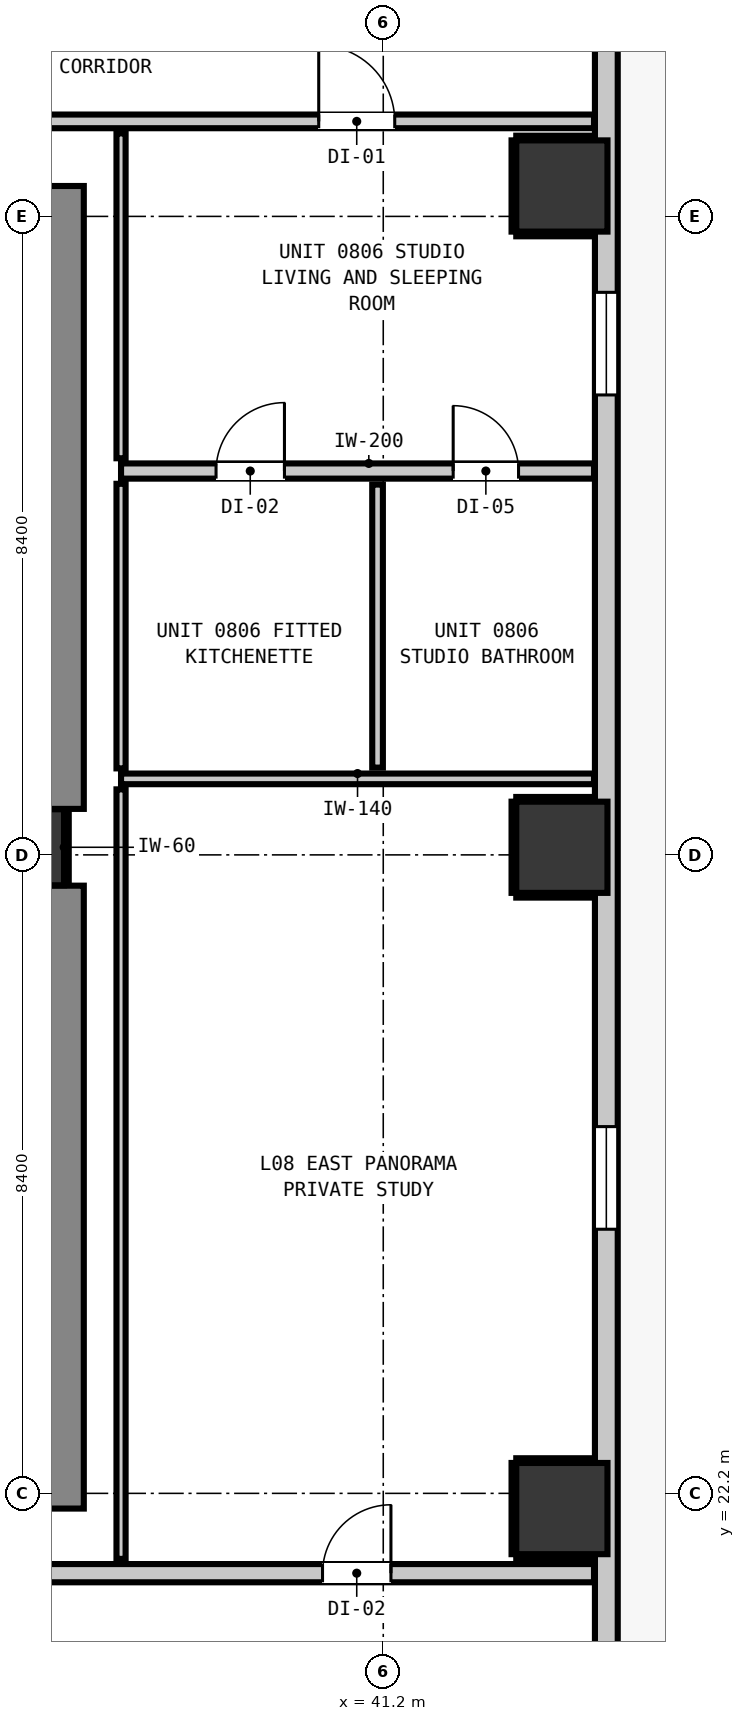
"""IFC4 building model, lengths in metres.
Left out: names, types, materials, properties, quantities, classifications, styles, units other than length and angle.
Written with IfcOpenShell. Run it as: python <this file> out.ifc"""

import sys

from ifc_helpers import new_model, si_unit, direction, frame, frame_2d, origin, origin_2d, place, context, subcontext, project, spatial, rectangle, extrude, element, fill, save


model = new_model("IFC4")
c1 = context("Model", 3, precision=1e-05, world=origin(), true_north=direction((0.0, 1.0)))
c2 = subcontext(c1, "Body", "Model", "MODEL_VIEW")
j1 = project(units=[si_unit("LENGTHUNIT", "METRE"), si_unit("PLANEANGLEUNIT", "RADIAN")], contexts=[c1])
p1 = place(None, origin())
s1 = spatial("IfcSite", under=j1, at=p1, CompositionType="ELEMENT")
p2 = place(p1, origin())
s2 = spatial("IfcBuilding", under=s1, at=p2, CompositionType="ELEMENT")
p3 = place(p2, frame((0.0, 0.0, 31.96)))
s3 = spatial("IfcBuildingStorey", under=s2, at=p3, CompositionType="ELEMENT", Elevation=31.96)
p4 = place(p3, frame((36.5, 30.7, 0.0), z_axis=(0.0, 0.0, 1.0), x_axis=(1.0, 0.0, 0.0)))
e1 = element("IfcColumn", 1, at=p4, inside=s3, PredefinedType="COLUMN", context=c2, shape_type="SweptSolid", body=[
    extrude(rectangle(XDim=1.0, YDim=1.0, at=origin_2d()), origin(), (0.0, 0.0, 1.0), 3.32),
])
p5 = place(p3, frame((36.66, 22.0, 0.0), z_axis=(0.0, 0.0, 1.0), x_axis=(0.0, 1.0, 0.0)))
e2 = element("IfcWall", 2, at=p5, inside=s3, PredefinedType="SHEAR", context=c2, shape_type="SweptSolid", body=[
    extrude(rectangle(XDim=8.195, YDim=1.2, at=frame_2d((4.098, 0.0))), origin(), (0.0, 0.0, 1.0), 3.32),
])
p6 = place(p3, frame((36.66, 31.205, 0.0), z_axis=(0.0, 0.0, 1.0), x_axis=(0.0, 1.0, 0.0)))
e3 = element("IfcWall", 3, at=p6, inside=s3, PredefinedType="SHEAR", context=c2, shape_type="SweptSolid", body=[
    extrude(rectangle(XDim=8.195, YDim=1.2, at=frame_2d((4.097, 0.0))), origin(), (0.0, 0.0, 1.0), 3.32),
])
for number, where, z_axis, x_axis in (
    (4, (43.55, 22.0, 0.0), (0.0, 0.0, 1.0), (1.0, 0.0, 0.0)),
    (5, (43.55, 30.7, 0.0), (0.0, 0.0, 1.0), (1.0, 0.0, 0.0)),
    (6, (43.55, 39.4, 0.0), (0.0, 0.0, 1.0), (1.0, 0.0, 0.0)),
):
    element("IfcColumn", number, at=place(p3, frame(where, z_axis=z_axis, x_axis=x_axis)), inside=s3, PredefinedType="COLUMN", context=c2, shape_type="SweptSolid", body=[
        extrude(rectangle(XDim=1.2, YDim=1.2, at=origin_2d()), origin(), (0.0, 0.0, 1.0), 3.32),
    ])
p7 = place(p3, frame((44.135, 44.835, 0.0), z_axis=(0.0, 0.0, 1.0), x_axis=(0.0, -1.0, 0.0)))
e7 = element("IfcWall", 7, at=p7, inside=s3, PredefinedType="STANDARD", context=c2, shape_type="SweptSolid", body=[
    extrude(rectangle(XDim=34.67, YDim=0.3, at=frame_2d((17.335, 0.0))), origin(), (0.0, 0.0, 1.0), 3.06),
])
p8 = place(p7, frame((1.251, 0.0, 0.0)))
e8 = element("IfcOpeningElement", 8, at=p8, cuts=e7, PredefinedType="OPENING", context=c2, shape_type="SweptSolid", body=[
    extrude(rectangle(XDim=1.0, YDim=2.15, at=frame_2d((0.5, 1.075))), frame((0.0, 0.16, 0.0), z_axis=(0.0, -1.0, 0.0), x_axis=(1.0, 0.0, 0.0)), (0.0, 0.0, 1.0), 0.32),
])
p9 = place(p7, frame((32.583, 0.0, 0.85)))
e9 = element("IfcOpeningElement", 9, at=p9, cuts=e7, PredefinedType="OPENING", context=c2, shape_type="SweptSolid", body=[
    extrude(rectangle(XDim=1.35, YDim=1.85, at=frame_2d((0.675, 0.925))), frame((0.0, 0.16, 0.0), z_axis=(0.0, -1.0, 0.0), x_axis=(1.0, 0.0, 0.0)), (0.0, 0.0, 1.0), 0.32),
])
p10 = place(p7, frame((17.81, 0.0, 0.85)))
e10 = element("IfcOpeningElement", 10, at=p10, cuts=e7, PredefinedType="OPENING", context=c2, shape_type="SweptSolid", body=[
    extrude(rectangle(XDim=1.35, YDim=1.85, at=frame_2d((0.675, 0.925))), frame((0.0, 0.16, 0.0), z_axis=(0.0, -1.0, 0.0), x_axis=(1.0, 0.0, 0.0)), (0.0, 0.0, 1.0), 0.32),
])
p11 = place(p7, frame((6.834, 0.0, 0.85)))
e11 = element("IfcOpeningElement", 11, at=p11, cuts=e7, PredefinedType="OPENING", context=c2, shape_type="SweptSolid", body=[
    extrude(rectangle(XDim=1.35, YDim=1.85, at=frame_2d((0.675, 0.925))), frame((0.0, 0.16, 0.0), z_axis=(0.0, -1.0, 0.0), x_axis=(1.0, 0.0, 0.0)), (0.0, 0.0, 1.0), 0.32),
])
p12 = place(p3, frame((1.827, 21.15, 0.0), z_axis=(0.0, 0.0, 1.0), x_axis=(1.0, 0.0, 0.0)))
e12 = element("IfcWall", 12, at=p12, inside=s3, PredefinedType="PARTITIONING", context=c2, shape_type="SweptSolid", body=[
    extrude(rectangle(XDim=42.146, YDim=0.24, at=frame_2d((21.073, 0.0))), origin(), (0.0, 0.0, 1.0), 3.06),
])
p13 = place(p12, frame((16.383, 0.0, 0.0)))
e13 = element("IfcOpeningElement", 13, at=p13, cuts=e12, PredefinedType="OPENING", context=c2, shape_type="SweptSolid", body=[
    extrude(rectangle(XDim=1.1, YDim=2.15, at=frame_2d((0.55, 1.075))), frame((0.0, 0.13, 0.0), z_axis=(0.0, -1.0, 0.0), x_axis=(1.0, 0.0, 0.0)), (0.0, 0.0, 1.0), 0.26),
])
p14 = place(p12, frame((8.647, 0.0, 0.0)))
e14 = element("IfcOpeningElement", 14, at=p14, cuts=e12, PredefinedType="OPENING", context=c2, shape_type="SweptSolid", body=[
    extrude(rectangle(XDim=1.4, YDim=2.15, at=frame_2d((0.7, 1.075))), frame((0.0, 0.13, 0.0), z_axis=(0.0, -1.0, 0.0), x_axis=(1.0, 0.0, 0.0)), (0.0, 0.0, 1.0), 0.26),
])
p15 = place(p12, frame((38.574, 0.0, 0.0)))
e15 = element("IfcOpeningElement", 15, at=p15, cuts=e12, PredefinedType="OPENING", context=c2, shape_type="SweptSolid", body=[
    extrude(rectangle(XDim=0.9, YDim=2.1, at=frame_2d((0.45, 1.05))), frame((0.0, 0.13, 0.0), z_axis=(0.0, -1.0, 0.0), x_axis=(1.0, 0.0, 0.0)), (0.0, 0.0, 1.0), 0.26),
])
p16 = place(p3, frame((37.75, 35.65, 0.0), z_axis=(0.0, 0.0, 1.0), x_axis=(1.0, 0.0, 0.0)))
e16 = element("IfcWall", 16, at=p16, inside=s3, PredefinedType="PARTITIONING", context=c2, shape_type="SweptSolid", body=[
    extrude(rectangle(XDim=6.223, YDim=0.2, at=frame_2d((3.111, 0.0))), origin(), (0.0, 0.0, 1.0), 3.06),
])
p17 = place(p16, frame((1.25, 0.0, 0.0)))
e17 = element("IfcOpeningElement", 17, at=p17, cuts=e16, PredefinedType="OPENING", context=c2, shape_type="SweptSolid", body=[
    extrude(rectangle(XDim=0.9, YDim=2.1, at=frame_2d((0.45, 1.05))), frame((0.0, 0.11, 0.0), z_axis=(0.0, -1.0, 0.0), x_axis=(1.0, 0.0, 0.0)), (0.0, 0.0, 1.0), 0.22),
])
p18 = place(p16, frame((4.37, 0.0, 0.0)))
e18 = element("IfcOpeningElement", 18, at=p18, cuts=e16, PredefinedType="OPENING", context=c2, shape_type="SweptSolid", body=[
    extrude(rectangle(XDim=0.86, YDim=2.02, at=frame_2d((0.43, 1.01))), frame((0.0, 0.11, 0.0), z_axis=(0.0, -1.0, 0.0), x_axis=(1.0, 0.0, 0.0)), (0.0, 0.0, 1.0), 0.22),
])
p19 = place(p3, frame((12.989, 40.25, 0.0), z_axis=(0.0, 0.0, 1.0), x_axis=(1.0, 0.0, 0.0)))
e19 = element("IfcWall", 19, at=p19, inside=s3, PredefinedType="PARTITIONING", context=c2, shape_type="SweptSolid", body=[
    extrude(rectangle(XDim=30.984, YDim=0.18, at=frame_2d((15.492, 0.0))), origin(), (0.0, 0.0, 1.0), 3.06),
])
p20 = place(p19, frame((4.446, 0.0, 0.0)))
e20 = element("IfcOpeningElement", 20, at=p20, cuts=e19, PredefinedType="OPENING", context=c2, shape_type="SweptSolid", body=[
    extrude(rectangle(XDim=1.4, YDim=2.15, at=frame_2d((0.7, 1.075))), frame((0.0, 0.1, 0.0), z_axis=(0.0, -1.0, 0.0), x_axis=(1.0, 0.0, 0.0)), (0.0, 0.0, 1.0), 0.2),
])
p21 = place(p19, frame((27.362, 0.0, 0.0)))
e21 = element("IfcOpeningElement", 21, at=p21, cuts=e19, PredefinedType="OPENING", context=c2, shape_type="SweptSolid", body=[
    extrude(rectangle(XDim=1.0, YDim=2.15, at=frame_2d((0.5, 1.075))), frame((0.0, 0.1, 0.0), z_axis=(0.0, -1.0, 0.0), x_axis=(1.0, 0.0, 0.0)), (0.0, 0.0, 1.0), 0.2),
])
p22 = place(p3, frame((37.75, 31.6, 0.0), z_axis=(0.0, 0.0, 1.0), x_axis=(1.0, 0.0, 0.0)))
e22 = element("IfcWall", 22, at=p22, inside=s3, PredefinedType="PARTITIONING", context=c2, shape_type="SweptSolid", body=[
    extrude(rectangle(XDim=6.223, YDim=0.14, at=frame_2d((3.111, 0.0))), origin(), (0.0, 0.0, 1.0), 3.06),
])
p23 = place(p3, frame((41.125, 31.748, 0.0), z_axis=(0.0, 0.0, 1.0), x_axis=(0.0, 1.0, 0.0)))
e23 = element("IfcWall", 23, at=p23, inside=s3, PredefinedType="PARTITIONING", context=c2, shape_type="SweptSolid", body=[
    extrude(rectangle(XDim=3.724, YDim=0.14, at=frame_2d((1.862, 0.0))), origin(), (0.0, 0.0, 1.0), 3.06),
])
p24 = place(p3, frame((37.75, 21.338, 0.0), z_axis=(0.0, 0.0, 1.0), x_axis=(0.0, 1.0, 0.0)))
e24 = element("IfcWall", 24, at=p24, inside=s3, PredefinedType="PARTITIONING", context=c2, shape_type="SweptSolid", body=[
    extrude(rectangle(XDim=10.124, YDim=0.12, at=frame_2d((5.062, 0.0))), origin(), (0.0, 0.0, 1.0), 3.06),
])
p25 = place(p3, frame((37.75, 31.738, 0.0), z_axis=(0.0, 0.0, 1.0), x_axis=(0.0, 1.0, 0.0)))
e25 = element("IfcWall", 25, at=p25, inside=s3, PredefinedType="PARTITIONING", context=c2, shape_type="SweptSolid", body=[
    extrude(rectangle(XDim=3.744, YDim=0.12, at=frame_2d((1.872, 0.0))), origin(), (0.0, 0.0, 1.0), 3.06),
])
p26 = place(p3, frame((37.75, 35.818, 0.0), z_axis=(0.0, 0.0, 1.0), x_axis=(0.0, 1.0, 0.0)))
e26 = element("IfcWall", 26, at=p26, inside=s3, PredefinedType="PARTITIONING", context=c2, shape_type="SweptSolid", body=[
    extrude(rectangle(XDim=4.274, YDim=0.12, at=frame_2d((2.137, 0.0))), origin(), (0.0, 0.0, 1.0), 3.06),
])
p27 = place(p3, frame((37.032, 30.21, 0.0), z_axis=(0.0, 0.0, 1.0), x_axis=(0.0, 1.0, 0.0)))
e27 = element("IfcWall", 27, at=p27, inside=s3, PredefinedType="PARTITIONING", context=c2, shape_type="SweptSolid", body=[
    extrude(rectangle(XDim=0.98, YDim=0.06, at=frame_2d((0.49, 0.0))), origin(), (0.0, 0.0, 1.0), 1.45),
])
for number, where, z_axis, x_axis in (
    (28, (42.95, 21.368, 0.0), (0.0, 0.0, 1.0), (1.0, 0.0, 0.0)),
    (29, (42.95, 22.632, 0.0), (0.0, 0.0, 1.0), (1.0, 0.0, 0.0)),
):
    element("IfcWall", number, at=place(p3, frame(where, z_axis=z_axis, x_axis=x_axis)), inside=s3, PredefinedType="PARTITIONING", context=c2, shape_type="SweptSolid", body=[
        extrude(rectangle(XDim=1.02, YDim=0.06, at=frame_2d((0.51, 0.0))), origin(), (0.0, 0.0, 1.0), 1.45),
    ])
p28 = place(p3, frame((42.918, 21.4, 0.0), z_axis=(0.0, 0.0, 1.0), x_axis=(0.0, 1.0, 0.0)))
e30 = element("IfcWall", 30, at=p28, inside=s3, PredefinedType="PARTITIONING", context=c2, shape_type="SweptSolid", body=[
    extrude(rectangle(XDim=1.2, YDim=0.06, at=frame_2d((0.6, 0.0))), origin(), (0.0, 0.0, 1.0), 1.45),
])
for number, where, z_axis, x_axis in (
    (31, (42.95, 30.068, 0.0), (0.0, 0.0, 1.0), (1.0, 0.0, 0.0)),
    (32, (42.95, 31.332, 0.0), (0.0, 0.0, 1.0), (1.0, 0.0, 0.0)),
):
    element("IfcWall", number, at=place(p3, frame(where, z_axis=z_axis, x_axis=x_axis)), inside=s3, PredefinedType="PARTITIONING", context=c2, shape_type="SweptSolid", body=[
        extrude(rectangle(XDim=1.02, YDim=0.06, at=frame_2d((0.51, 0.0))), origin(), (0.0, 0.0, 1.0), 1.45),
    ])
p29 = place(p3, frame((42.918, 30.1, 0.0), z_axis=(0.0, 0.0, 1.0), x_axis=(0.0, 1.0, 0.0)))
e33 = element("IfcWall", 33, at=p29, inside=s3, PredefinedType="PARTITIONING", context=c2, shape_type="SweptSolid", body=[
    extrude(rectangle(XDim=1.2, YDim=0.06, at=frame_2d((0.6, 0.0))), origin(), (0.0, 0.0, 1.0), 1.45),
])
for number, where, z_axis, x_axis in (
    (34, (42.95, 38.768, 0.0), (0.0, 0.0, 1.0), (1.0, 0.0, 0.0)),
    (35, (42.95, 40.032, 0.0), (0.0, 0.0, 1.0), (1.0, 0.0, 0.0)),
):
    element("IfcWall", number, at=place(p3, frame(where, z_axis=z_axis, x_axis=x_axis)), inside=s3, PredefinedType="PARTITIONING", context=c2, shape_type="SweptSolid", body=[
        extrude(rectangle(XDim=1.02, YDim=0.06, at=frame_2d((0.51, 0.0))), origin(), (0.0, 0.0, 1.0), 1.45),
    ])
p30 = place(p3, frame((42.918, 38.8, 0.0), z_axis=(0.0, 0.0, 1.0), x_axis=(0.0, 1.0, 0.0)))
e36 = element("IfcWall", 36, at=p30, inside=s3, PredefinedType="PARTITIONING", context=c2, shape_type="SweptSolid", body=[
    extrude(rectangle(XDim=1.2, YDim=0.06, at=frame_2d((0.6, 0.0))), origin(), (0.0, 0.0, 1.0), 1.45),
])
p31 = place(p10, origin())
e37 = element("IfcWindow", 37, at=p31, inside=s3, PartitioningType="SINGLE_PANEL", PredefinedType="WINDOW", context=c2, shape_type="SweptSolid", body=[
    extrude(rectangle(XDim=1.35, YDim=1.85, at=frame_2d((0.675, 0.925))), frame((0.0, 0.03, 0.0), z_axis=(0.0, -1.0, 0.0), x_axis=(1.0, 0.0, 0.0)), (0.0, 0.0, 1.0), 0.06),
])
fill(e10, e37)
p32 = place(p11, origin())
e38 = element("IfcWindow", 38, at=p32, inside=s3, PartitioningType="SINGLE_PANEL", PredefinedType="WINDOW", context=c2, shape_type="SweptSolid", body=[
    extrude(rectangle(XDim=1.35, YDim=1.85, at=frame_2d((0.675, 0.925))), frame((0.0, 0.03, 0.0), z_axis=(0.0, -1.0, 0.0), x_axis=(1.0, 0.0, 0.0)), (0.0, 0.0, 1.0), 0.06),
])
fill(e11, e38)
p33 = place(p15, origin())
e39 = element("IfcDoor", 39, at=p33, inside=s3, OperationType="SINGLE_SWING_RIGHT", PredefinedType="DOOR", context=c2, shape_type="SweptSolid", body=[
    extrude(rectangle(XDim=0.9, YDim=2.1, at=frame_2d((0.45, 1.05))), frame((0.0, 0.025, 0.0), z_axis=(0.0, -1.0, 0.0), x_axis=(1.0, 0.0, 0.0)), (0.0, 0.0, 1.0), 0.05),
])
fill(e15, e39)
p34 = place(p21, origin())
e40 = element("IfcDoor", 40, at=p34, inside=s3, OperationType="SINGLE_SWING_LEFT", PredefinedType="DOOR", context=c2, shape_type="SweptSolid", body=[
    extrude(rectangle(XDim=1.0, YDim=2.15, at=frame_2d((0.5, 1.075))), frame((0.0, 0.025, 0.0), z_axis=(0.0, -1.0, 0.0), x_axis=(1.0, 0.0, 0.0)), (0.0, 0.0, 1.0), 0.05),
])
fill(e21, e40)
p35 = place(p17, origin())
e41 = element("IfcDoor", 41, at=p35, inside=s3, OperationType="SINGLE_SWING_RIGHT", PredefinedType="DOOR", context=c2, shape_type="SweptSolid", body=[
    extrude(rectangle(XDim=0.9, YDim=2.1, at=frame_2d((0.45, 1.05))), frame((0.0, 0.025, 0.0), z_axis=(0.0, -1.0, 0.0), x_axis=(1.0, 0.0, 0.0)), (0.0, 0.0, 1.0), 0.05),
])
fill(e17, e41)
p36 = place(p18, origin())
e42 = element("IfcDoor", 42, at=p36, inside=s3, OperationType="SINGLE_SWING_LEFT", PredefinedType="DOOR", context=c2, shape_type="SweptSolid", body=[
    extrude(rectangle(XDim=0.86, YDim=2.02, at=frame_2d((0.43, 1.01))), frame((0.0, 0.025, 0.0), z_axis=(0.0, -1.0, 0.0), x_axis=(1.0, 0.0, 0.0)), (0.0, 0.0, 1.0), 0.05),
])
fill(e18, e42)
save(model, sys.argv[1])
